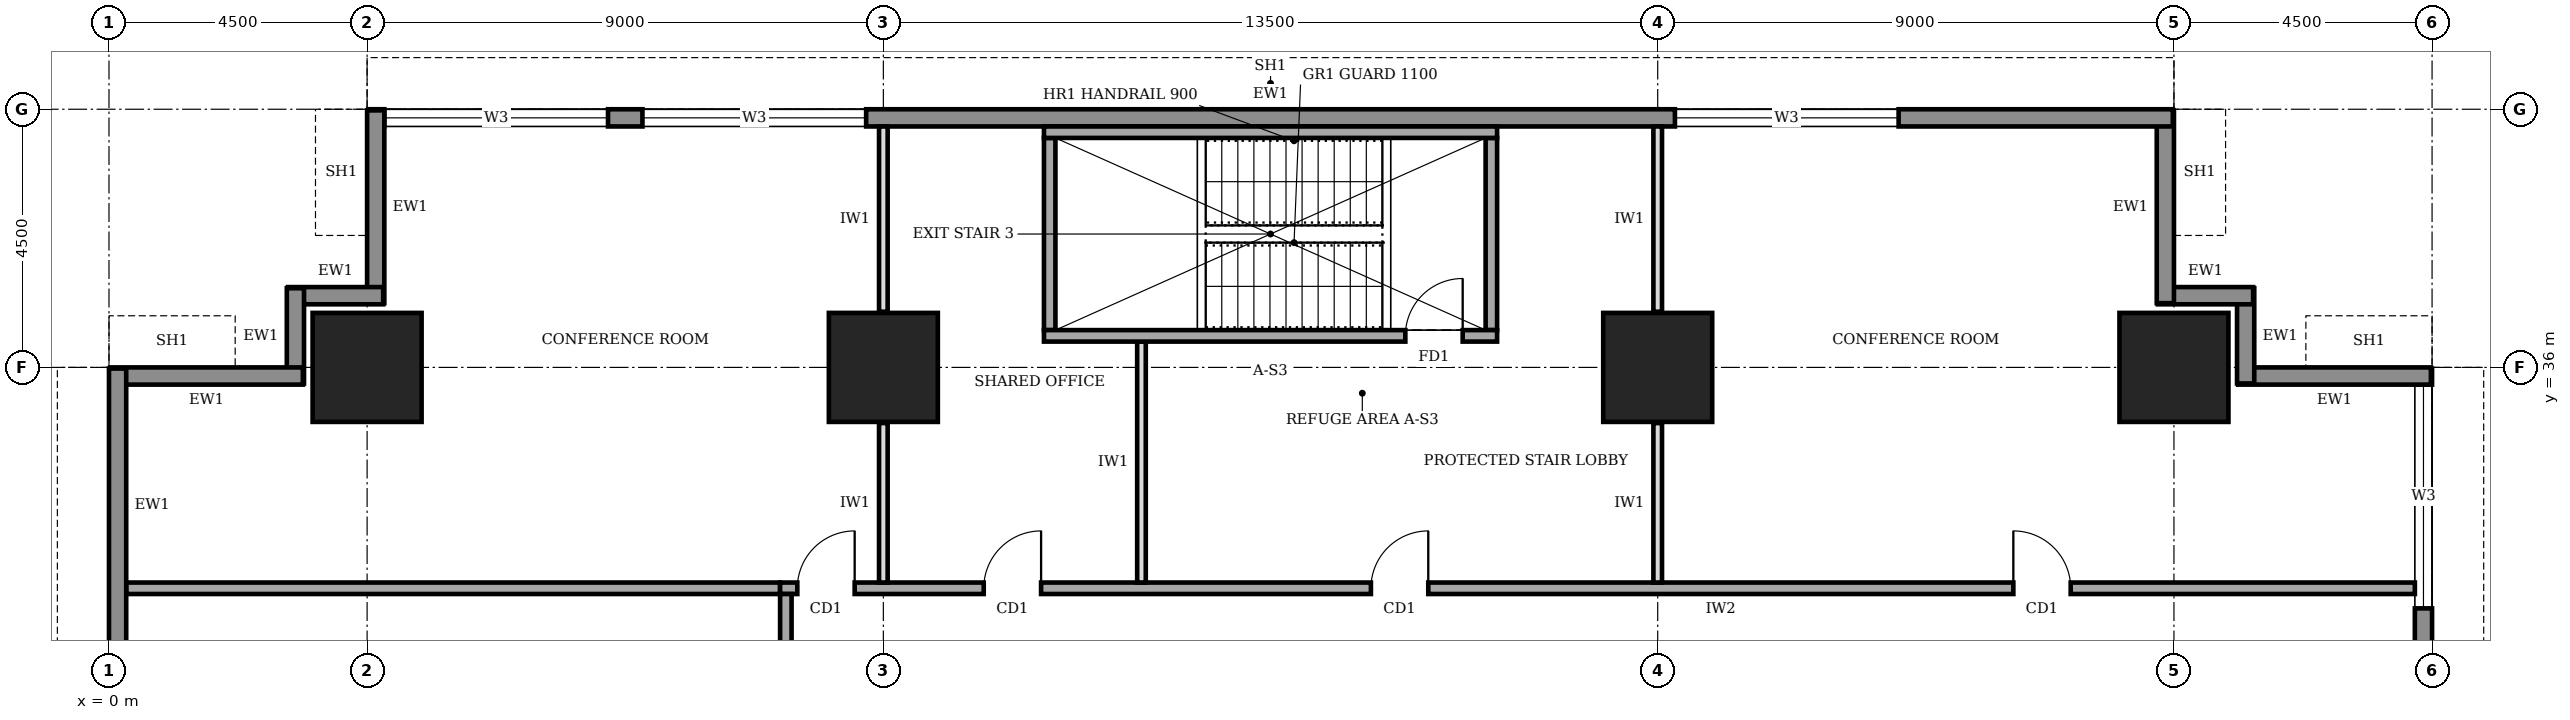
"""IFC4 building model, lengths in metres.
Left out: names, types, materials, properties, quantities, classifications, styles, units other than length and angle.
Written with IfcOpenShell. Run it as: python <this file> out.ifc"""

import sys

from ifc_helpers import new_model, si_unit, direction, frame, frame_2d, origin, origin_2d, place, context, subcontext, project, spatial, rectangle, extrude, element, fill, save


model = new_model("IFC4")
c1 = context("Model", 3, precision=1e-05, world=origin(), true_north=direction((0.0, 1.0)))
c2 = subcontext(c1, "Body", "Model", "MODEL_VIEW")
j1 = project(units=[si_unit("LENGTHUNIT", "METRE"), si_unit("PLANEANGLEUNIT", "RADIAN")], contexts=[c1])
p1 = place(None, origin())
s1 = spatial("IfcSite", under=j1, at=p1, CompositionType="ELEMENT")
p2 = place(p1, origin())
s2 = spatial("IfcBuilding", under=s1, at=p2, CompositionType="ELEMENT")
p3 = place(p2, frame((0.0, 0.0, 101.0)))
s3 = spatial("IfcBuildingStorey", under=s2, at=p3, CompositionType="ELEMENT", Elevation=101.0)
for number, where, z_axis, x_axis in (
    (1, (4.5, 36.0, 0.0), (0.0, 0.0, 1.0), (1.0, 0.0, 0.0)),
    (2, (13.5, 36.0, 0.0), (0.0, 0.0, 1.0), (1.0, 0.0, 0.0)),
    (3, (27.0, 36.0, 0.0), (0.0, 0.0, 1.0), (1.0, 0.0, 0.0)),
    (4, (36.0, 36.0, 0.0), (0.0, 0.0, 1.0), (1.0, 0.0, 0.0)),
):
    element("IfcColumn", number, at=place(p3, frame(where, z_axis=z_axis, x_axis=x_axis)), inside=s3, PredefinedType="COLUMN", context=c2, shape_type="SweptSolid", body=[
        extrude(rectangle(XDim=1.9, YDim=1.9, at=origin_2d()), origin(), (0.0, 0.0, 1.0), 4.0),
    ])
p4 = place(p3, frame((40.48, 35.85, 0.0), z_axis=(0.0, 0.0, 1.0), x_axis=(-1.0, 0.0, 0.0)))
e5 = element("IfcWall", 5, at=p4, inside=s3, PredefinedType="STANDARD", context=c2, shape_type="SweptSolid", body=[
    extrude(rectangle(XDim=3.36, YDim=0.3, at=frame_2d((1.68, 0.0))), origin(), (0.0, 0.0, 1.0), 2.85),
])
for number, where, z_axis, x_axis in (
    (6, (37.25, 35.72, 0.0), (0.0, 0.0, 1.0), (0.0, 1.0, 0.0)),
    (7, (37.38, 37.25, 0.0), (0.0, 0.0, 1.0), (-1.0, 0.0, 0.0)),
):
    element("IfcWall", number, at=place(p3, frame(where, z_axis=z_axis, x_axis=x_axis)), inside=s3, PredefinedType="STANDARD", context=c2, shape_type="SweptSolid", body=[
        extrude(rectangle(XDim=1.66, YDim=0.3, at=frame_2d((0.83, 0.0))), origin(), (0.0, 0.0, 1.0), 3.75),
    ])
p5 = place(p3, frame((35.85, 37.12, 0.0), z_axis=(0.0, 0.0, 1.0), x_axis=(0.0, 1.0, 0.0)))
e8 = element("IfcWall", 8, at=p5, inside=s3, PredefinedType="STANDARD", context=c2, shape_type="SweptSolid", body=[
    extrude(rectangle(XDim=3.36, YDim=0.3, at=frame_2d((1.68, 0.0))), origin(), (0.0, 0.0, 1.0), 2.85),
])
p6 = place(p3, frame((35.98, 40.35, 0.0), z_axis=(0.0, 0.0, 1.0), x_axis=(-1.0, 0.0, 0.0)))
e9 = element("IfcWall", 9, at=p6, inside=s3, PredefinedType="STANDARD", context=c2, shape_type="SweptSolid", body=[
    extrude(rectangle(XDim=31.46, YDim=0.3, at=frame_2d((15.73, 0.0))), origin(), (0.0, 0.0, 1.0), 3.75),
])
p7 = place(p6, frame((27.28, 0.0, 0.95)))
e10 = element("IfcOpeningElement", 10, at=p7, cuts=e9, PredefinedType="OPENING", context=c2, shape_type="SweptSolid", body=[
    extrude(rectangle(XDim=3.9, YDim=1.8, at=frame_2d((1.95, 0.9))), frame((0.0, 0.16, 0.0), z_axis=(0.0, -1.0, 0.0), x_axis=(1.0, 0.0, 0.0)), (0.0, 0.0, 1.0), 0.32),
])
p8 = place(p6, frame((22.78, 0.0, 0.95)))
e11 = element("IfcOpeningElement", 11, at=p8, cuts=e9, PredefinedType="OPENING", context=c2, shape_type="SweptSolid", body=[
    extrude(rectangle(XDim=3.9, YDim=1.8, at=frame_2d((1.95, 0.9))), frame((0.0, 0.16, 0.0), z_axis=(0.0, -1.0, 0.0), x_axis=(1.0, 0.0, 0.0)), (0.0, 0.0, 1.0), 0.32),
])
p9 = place(p6, frame((4.78, 0.0, 0.95)))
e12 = element("IfcOpeningElement", 12, at=p9, cuts=e9, PredefinedType="OPENING", context=c2, shape_type="SweptSolid", body=[
    extrude(rectangle(XDim=3.9, YDim=1.8, at=frame_2d((1.95, 0.9))), frame((0.0, 0.16, 0.0), z_axis=(0.0, -1.0, 0.0), x_axis=(1.0, 0.0, 0.0)), (0.0, 0.0, 1.0), 0.32),
])
p10 = place(p3, frame((4.65, 40.48, 0.0), z_axis=(0.0, 0.0, 1.0), x_axis=(0.0, -1.0, 0.0)))
e13 = element("IfcWall", 13, at=p10, inside=s3, PredefinedType="STANDARD", context=c2, shape_type="SweptSolid", body=[
    extrude(rectangle(XDim=3.36, YDim=0.3, at=frame_2d((1.68, 0.0))), origin(), (0.0, 0.0, 1.0), 2.85),
])
for number, where, z_axis, x_axis in (
    (14, (4.78, 37.25, 0.0), (0.0, 0.0, 1.0), (-1.0, 0.0, 0.0)),
    (15, (3.25, 37.38, 0.0), (0.0, 0.0, 1.0), (0.0, -1.0, 0.0)),
):
    element("IfcWall", number, at=place(p3, frame(where, z_axis=z_axis, x_axis=x_axis)), inside=s3, PredefinedType="STANDARD", context=c2, shape_type="SweptSolid", body=[
        extrude(rectangle(XDim=1.66, YDim=0.3, at=frame_2d((0.83, 0.0))), origin(), (0.0, 0.0, 1.0), 3.75),
    ])
p11 = place(p3, frame((3.38, 35.85, 0.0), z_axis=(0.0, 0.0, 1.0), x_axis=(-1.0, 0.0, 0.0)))
e16 = element("IfcWall", 16, at=p11, inside=s3, PredefinedType="STANDARD", context=c2, shape_type="SweptSolid", body=[
    extrude(rectangle(XDim=3.36, YDim=0.3, at=frame_2d((1.68, 0.0))), origin(), (0.0, 0.0, 1.0), 2.85),
])
p12 = place(p3, frame((0.15, 35.98, 0.0), z_axis=(0.0, 0.0, 1.0), x_axis=(0.0, -1.0, 0.0)))
e17 = element("IfcWall", 17, at=p12, inside=s3, PredefinedType="STANDARD", context=c2, shape_type="SweptSolid", body=[
    extrude(rectangle(XDim=31.46, YDim=0.3, at=frame_2d((15.73, 0.0))), origin(), (0.0, 0.0, 1.0), 3.75),
])
p13 = place(p12, frame((27.28, 0.0, 0.95)))
e18 = element("IfcOpeningElement", 18, at=p13, cuts=e17, PredefinedType="OPENING", context=c2, shape_type="SweptSolid", body=[
    extrude(rectangle(XDim=3.9, YDim=1.8, at=frame_2d((1.95, 0.9))), frame((0.0, 0.16, 0.0), z_axis=(0.0, -1.0, 0.0), x_axis=(1.0, 0.0, 0.0)), (0.0, 0.0, 1.0), 0.32),
])
p14 = place(p12, frame((22.78, 0.0, 0.95)))
e19 = element("IfcOpeningElement", 19, at=p14, cuts=e17, PredefinedType="OPENING", context=c2, shape_type="SweptSolid", body=[
    extrude(rectangle(XDim=3.9, YDim=1.8, at=frame_2d((1.95, 0.9))), frame((0.0, 0.16, 0.0), z_axis=(0.0, -1.0, 0.0), x_axis=(1.0, 0.0, 0.0)), (0.0, 0.0, 1.0), 0.32),
])
p15 = place(p12, frame((18.28, 0.0, 0.95)))
e20 = element("IfcOpeningElement", 20, at=p15, cuts=e17, PredefinedType="OPENING", context=c2, shape_type="SweptSolid", body=[
    extrude(rectangle(XDim=3.9, YDim=1.8, at=frame_2d((1.95, 0.9))), frame((0.0, 0.16, 0.0), z_axis=(0.0, -1.0, 0.0), x_axis=(1.0, 0.0, 0.0)), (0.0, 0.0, 1.0), 0.32),
])
p16 = place(p12, frame((13.78, 0.0, 0.95)))
e21 = element("IfcOpeningElement", 21, at=p16, cuts=e17, PredefinedType="OPENING", context=c2, shape_type="SweptSolid", body=[
    extrude(rectangle(XDim=3.9, YDim=1.8, at=frame_2d((1.95, 0.9))), frame((0.0, 0.16, 0.0), z_axis=(0.0, -1.0, 0.0), x_axis=(1.0, 0.0, 0.0)), (0.0, 0.0, 1.0), 0.32),
])
p17 = place(p12, frame((9.28, 0.0, 0.95)))
e22 = element("IfcOpeningElement", 22, at=p17, cuts=e17, PredefinedType="OPENING", context=c2, shape_type="SweptSolid", body=[
    extrude(rectangle(XDim=3.9, YDim=1.8, at=frame_2d((1.95, 0.9))), frame((0.0, 0.16, 0.0), z_axis=(0.0, -1.0, 0.0), x_axis=(1.0, 0.0, 0.0)), (0.0, 0.0, 1.0), 0.32),
])
p18 = place(p12, frame((4.78, 0.0, 0.95)))
e23 = element("IfcOpeningElement", 23, at=p18, cuts=e17, PredefinedType="OPENING", context=c2, shape_type="SweptSolid", body=[
    extrude(rectangle(XDim=3.9, YDim=1.8, at=frame_2d((1.95, 0.9))), frame((0.0, 0.16, 0.0), z_axis=(0.0, -1.0, 0.0), x_axis=(1.0, 0.0, 0.0)), (0.0, 0.0, 1.0), 0.32),
])
p19 = place(p3, frame((40.2, 32.15, 0.0), z_axis=(0.0, 0.0, 1.0), x_axis=(-1.0, 0.0, 0.0)))
e24 = element("IfcWall", 24, at=p19, inside=s3, PredefinedType="SOLIDWALL", context=c2, shape_type="SweptSolid", body=[
    extrude(rectangle(XDim=28.5, YDim=0.2, at=frame_2d((14.25, 0.0))), origin(), (0.0, 0.0, 1.0), 3.75),
])
p20 = place(p19, frame((27.2, 0.0, 0.0)))
e25 = element("IfcOpeningElement", 25, at=p20, cuts=e24, PredefinedType="OPENING", context=c2, shape_type="SweptSolid", body=[
    extrude(rectangle(XDim=1.0, YDim=2.1, at=frame_2d((0.5, 1.05))), frame((0.0, 0.11, 0.0), z_axis=(0.0, -1.0, 0.0), x_axis=(1.0, 0.0, 0.0)), (0.0, 0.0, 1.0), 0.22),
])
p21 = place(p19, frame((23.95, 0.0, 0.0)))
e26 = element("IfcOpeningElement", 26, at=p21, cuts=e24, PredefinedType="OPENING", context=c2, shape_type="SweptSolid", body=[
    extrude(rectangle(XDim=1.0, YDim=2.1, at=frame_2d((0.5, 1.05))), frame((0.0, 0.11, 0.0), z_axis=(0.0, -1.0, 0.0), x_axis=(1.0, 0.0, 0.0)), (0.0, 0.0, 1.0), 0.22),
])
p22 = place(p19, frame((17.2, 0.0, 0.0)))
e27 = element("IfcOpeningElement", 27, at=p22, cuts=e24, PredefinedType="OPENING", context=c2, shape_type="SweptSolid", body=[
    extrude(rectangle(XDim=1.0, YDim=2.1, at=frame_2d((0.5, 1.05))), frame((0.0, 0.11, 0.0), z_axis=(0.0, -1.0, 0.0), x_axis=(1.0, 0.0, 0.0)), (0.0, 0.0, 1.0), 0.22),
])
p23 = place(p19, frame((6.0, 0.0, 0.0)))
e28 = element("IfcOpeningElement", 28, at=p23, cuts=e24, PredefinedType="OPENING", context=c2, shape_type="SweptSolid", body=[
    extrude(rectangle(XDim=1.0, YDim=2.1, at=frame_2d((0.5, 1.05))), frame((0.0, 0.11, 0.0), z_axis=(0.0, -1.0, 0.0), x_axis=(1.0, 0.0, 0.0)), (0.0, 0.0, 1.0), 0.22),
])
p24 = place(p3, frame((11.8, 32.05, 0.0), z_axis=(0.0, 0.0, 1.0), x_axis=(0.0, -1.0, 0.0)))
e29 = element("IfcWall", 29, at=p24, inside=s3, PredefinedType="SOLIDWALL", context=c2, shape_type="SweptSolid", body=[
    extrude(rectangle(XDim=23.8, YDim=0.2, at=frame_2d((11.9, 0.0))), origin(), (0.0, 0.0, 1.0), 3.75),
])
p25 = place(p24, frame((20.675, 0.0, 0.0)))
e30 = element("IfcOpeningElement", 30, at=p25, cuts=e29, PredefinedType="OPENING", context=c2, shape_type="SweptSolid", body=[
    extrude(rectangle(XDim=1.0, YDim=2.1, at=frame_2d((0.5, 1.05))), frame((0.0, 0.11, 0.0), z_axis=(0.0, -1.0, 0.0), x_axis=(1.0, 0.0, 0.0)), (0.0, 0.0, 1.0), 0.22),
])
p26 = place(p24, frame((16.2, 0.0, 0.0)))
e31 = element("IfcOpeningElement", 31, at=p26, cuts=e29, PredefinedType="OPENING", context=c2, shape_type="SweptSolid", body=[
    extrude(rectangle(XDim=0.9, YDim=2.1, at=frame_2d((0.45, 1.05))), frame((0.0, 0.11, 0.0), z_axis=(0.0, -1.0, 0.0), x_axis=(1.0, 0.0, 0.0)), (0.0, 0.0, 1.0), 0.22),
])
p27 = place(p24, frame((13.2, 0.0, 0.0)))
e32 = element("IfcOpeningElement", 32, at=p27, cuts=e29, PredefinedType="OPENING", context=c2, shape_type="SweptSolid", body=[
    extrude(rectangle(XDim=0.9, YDim=2.1, at=frame_2d((0.45, 1.05))), frame((0.0, 0.11, 0.0), z_axis=(0.0, -1.0, 0.0), x_axis=(1.0, 0.0, 0.0)), (0.0, 0.0, 1.0), 0.22),
])
p28 = place(p24, frame((8.35, 0.0, 0.0)))
e33 = element("IfcOpeningElement", 33, at=p28, cuts=e29, PredefinedType="OPENING", context=c2, shape_type="SweptSolid", body=[
    extrude(rectangle(XDim=0.9, YDim=2.1, at=frame_2d((0.45, 1.05))), frame((0.0, 0.11, 0.0), z_axis=(0.0, -1.0, 0.0), x_axis=(1.0, 0.0, 0.0)), (0.0, 0.0, 1.0), 0.22),
])
p29 = place(p24, frame((5.55, 0.0, 0.0)))
e34 = element("IfcOpeningElement", 34, at=p29, cuts=e29, PredefinedType="OPENING", context=c2, shape_type="SweptSolid", body=[
    extrude(rectangle(XDim=1.0, YDim=2.1, at=frame_2d((0.5, 1.05))), frame((0.0, 0.11, 0.0), z_axis=(0.0, -1.0, 0.0), x_axis=(1.0, 0.0, 0.0)), (0.0, 0.0, 1.0), 0.22),
])
p30 = place(p24, frame((11.05, 0.0, 0.0)))
e35 = element("IfcOpeningElement", 35, at=p30, cuts=e29, PredefinedType="OPENING", context=c2, shape_type="SweptSolid", body=[
    extrude(rectangle(XDim=1.0, YDim=2.1, at=frame_2d((0.5, 1.05))), frame((0.0, 0.11, 0.0), z_axis=(0.0, -1.0, 0.0), x_axis=(1.0, 0.0, 0.0)), (0.0, 0.0, 1.0), 0.22),
])
p31 = place(p24, frame((1.925, 0.0, 0.0)))
e36 = element("IfcOpeningElement", 36, at=p31, cuts=e29, PredefinedType="OPENING", context=c2, shape_type="SweptSolid", body=[
    extrude(rectangle(XDim=1.0, YDim=2.1, at=frame_2d((0.5, 1.05))), frame((0.0, 0.11, 0.0), z_axis=(0.0, -1.0, 0.0), x_axis=(1.0, 0.0, 0.0)), (0.0, 0.0, 1.0), 0.22),
])
p32 = place(p3, frame((0.3, 32.15, 0.0), z_axis=(0.0, 0.0, 1.0), x_axis=(1.0, 0.0, 0.0)))
e37 = element("IfcWall", 37, at=p32, inside=s3, PredefinedType="SOLIDWALL", context=c2, shape_type="SweptSolid", body=[
    extrude(rectangle(XDim=11.4, YDim=0.2, at=frame_2d((5.7, 0.0))), origin(), (0.0, 0.0, 1.0), 3.75),
])
p33 = place(p3, frame((13.5, 32.25, 0.0), z_axis=(0.0, 0.0, 1.0), x_axis=(0.0, 1.0, 0.0)))
e38 = element("IfcWall", 38, at=p33, inside=s3, PredefinedType="PARTITIONING", context=c2, shape_type="SweptSolid", body=[
    extrude(rectangle(XDim=2.78, YDim=0.15, at=frame_2d((1.39, 0.0))), origin(), (0.0, 0.0, 1.0), 2.85),
])
p34 = place(p3, frame((13.5, 36.97, 0.0), z_axis=(0.0, 0.0, 1.0), x_axis=(0.0, 1.0, 0.0)))
e39 = element("IfcWall", 39, at=p34, inside=s3, PredefinedType="PARTITIONING", context=c2, shape_type="SweptSolid", body=[
    extrude(rectangle(XDim=3.23, YDim=0.15, at=frame_2d((1.615, 0.0))), origin(), (0.0, 0.0, 1.0), 2.85),
])
p35 = place(p3, frame((18.0, 32.25, 0.0), z_axis=(0.0, 0.0, 1.0), x_axis=(0.0, 1.0, 0.0)))
e40 = element("IfcWall", 40, at=p35, inside=s3, PredefinedType="PARTITIONING", context=c2, shape_type="SweptSolid", body=[
    extrude(rectangle(XDim=4.2, YDim=0.15, at=frame_2d((2.1, 0.0))), origin(), (0.0, 0.0, 1.0), 3.75),
])
p36 = place(p3, frame((27.0, 32.25, 0.0), z_axis=(0.0, 0.0, 1.0), x_axis=(0.0, 1.0, 0.0)))
e41 = element("IfcWall", 41, at=p36, inside=s3, PredefinedType="PARTITIONING", context=c2, shape_type="SweptSolid", body=[
    extrude(rectangle(XDim=2.78, YDim=0.15, at=frame_2d((1.39, 0.0))), origin(), (0.0, 0.0, 1.0), 2.85),
])
p37 = place(p3, frame((27.0, 36.97, 0.0), z_axis=(0.0, 0.0, 1.0), x_axis=(0.0, 1.0, 0.0)))
e42 = element("IfcWall", 42, at=p37, inside=s3, PredefinedType="PARTITIONING", context=c2, shape_type="SweptSolid", body=[
    extrude(rectangle(XDim=3.23, YDim=0.15, at=frame_2d((1.615, 0.0))), origin(), (0.0, 0.0, 1.0), 2.85),
])
p38 = place(p3, frame((16.3, 36.55, 0.0), z_axis=(0.0, 0.0, 1.0), x_axis=(1.0, 0.0, 0.0)))
e43 = element("IfcWall", 43, at=p38, inside=s3, PredefinedType="SOLIDWALL", context=c2, shape_type="SweptSolid", body=[
    extrude(rectangle(XDim=7.9, YDim=0.2, at=frame_2d((3.95, 0.0))), origin(), (0.0, 0.0, 1.0), 3.75),
])
p39 = place(p38, frame((6.3, 0.0, 0.0)))
e44 = element("IfcOpeningElement", 44, at=p39, cuts=e43, PredefinedType="OPENING", context=c2, shape_type="SweptSolid", body=[
    extrude(rectangle(XDim=1.0, YDim=2.1, at=frame_2d((0.5, 1.05))), frame((0.0, 0.11, 0.0), z_axis=(0.0, -1.0, 0.0), x_axis=(1.0, 0.0, 0.0)), (0.0, 0.0, 1.0), 0.22),
])
p40 = place(p3, frame((16.3, 40.1, 0.0), z_axis=(0.0, 0.0, 1.0), x_axis=(1.0, 0.0, 0.0)))
e45 = element("IfcWall", 45, at=p40, inside=s3, PredefinedType="SOLIDWALL", context=c2, shape_type="SweptSolid", body=[
    extrude(rectangle(XDim=7.9, YDim=0.2, at=frame_2d((3.95, 0.0))), origin(), (0.0, 0.0, 1.0), 3.75),
])
for number, where, z_axis, x_axis in (
    (46, (16.4, 36.65, 0.0), (0.0, 0.0, 1.0), (0.0, 1.0, 0.0)),
    (47, (24.1, 36.65, 0.0), (0.0, 0.0, 1.0), (0.0, 1.0, 0.0)),
):
    element("IfcWall", number, at=place(p3, frame(where, z_axis=z_axis, x_axis=x_axis)), inside=s3, PredefinedType="SOLIDWALL", context=c2, shape_type="SweptSolid", body=[
        extrude(rectangle(XDim=3.35, YDim=0.2, at=frame_2d((1.675, 0.0))), origin(), (0.0, 0.0, 1.0), 3.75),
    ])
p41 = place(p3, frame((40.35, 29.25, 0.0), z_axis=(0.0, 0.0, 1.0), x_axis=(0.0, 1.0, 0.0)))
e48 = element("IfcWall", 48, at=p41, inside=s3, PredefinedType="STANDARD", context=c2, shape_type="SweptSolid", body=[
    extrude(rectangle(XDim=6.73, YDim=0.3, at=frame_2d((3.365, 0.0))), origin(), (0.0, 0.0, 1.0), 3.75),
])
p42 = place(p41, frame((2.55, 0.0, 0.95)))
e49 = element("IfcOpeningElement", 49, at=p42, cuts=e48, PredefinedType="OPENING", context=c2, shape_type="SweptSolid", body=[
    extrude(rectangle(XDim=3.9, YDim=1.8, at=frame_2d((1.95, 0.9))), frame((0.0, 0.16, 0.0), z_axis=(0.0, -1.0, 0.0), x_axis=(1.0, 0.0, 0.0)), (0.0, 0.0, 1.0), 0.32),
])
p43 = place(p42, origin())
e50 = element("IfcWindow", 50, at=p43, inside=s3, PartitioningType="SINGLE_PANEL", PredefinedType="WINDOW", context=c2, shape_type="SweptSolid", body=[
    extrude(rectangle(XDim=3.9, YDim=1.8, at=frame_2d((1.95, 0.9))), frame((0.0, 0.03, 0.0), z_axis=(0.0, -1.0, 0.0), x_axis=(1.0, 0.0, 0.0)), (0.0, 0.0, 1.0), 0.06),
])
fill(e49, e50)
p44 = place(p7, origin())
e51 = element("IfcWindow", 51, at=p44, inside=s3, PartitioningType="SINGLE_PANEL", PredefinedType="WINDOW", context=c2, shape_type="SweptSolid", body=[
    extrude(rectangle(XDim=3.9, YDim=1.8, at=frame_2d((1.95, 0.9))), frame((0.0, 0.03, 0.0), z_axis=(0.0, -1.0, 0.0), x_axis=(1.0, 0.0, 0.0)), (0.0, 0.0, 1.0), 0.06),
])
fill(e10, e51)
p45 = place(p8, origin())
e52 = element("IfcWindow", 52, at=p45, inside=s3, PartitioningType="SINGLE_PANEL", PredefinedType="WINDOW", context=c2, shape_type="SweptSolid", body=[
    extrude(rectangle(XDim=3.9, YDim=1.8, at=frame_2d((1.95, 0.9))), frame((0.0, 0.03, 0.0), z_axis=(0.0, -1.0, 0.0), x_axis=(1.0, 0.0, 0.0)), (0.0, 0.0, 1.0), 0.06),
])
fill(e11, e52)
p46 = place(p9, origin())
e53 = element("IfcWindow", 53, at=p46, inside=s3, PartitioningType="SINGLE_PANEL", PredefinedType="WINDOW", context=c2, shape_type="SweptSolid", body=[
    extrude(rectangle(XDim=3.9, YDim=1.8, at=frame_2d((1.95, 0.9))), frame((0.0, 0.03, 0.0), z_axis=(0.0, -1.0, 0.0), x_axis=(1.0, 0.0, 0.0)), (0.0, 0.0, 1.0), 0.06),
])
fill(e12, e53)
p47 = place(p20, frame((1.0, 0.0, 0.0), z_axis=(0.0, 0.0, 1.0), x_axis=(-1.0, 0.0, 0.0)))
e54 = element("IfcDoor", 54, at=p47, inside=s3, OperationType="SINGLE_SWING_RIGHT", PredefinedType="DOOR", context=c2, shape_type="SweptSolid", body=[
    extrude(rectangle(XDim=1.0, YDim=2.1, at=frame_2d((0.5, 1.05))), frame((0.0, 0.025, 0.0), z_axis=(0.0, -1.0, 0.0), x_axis=(1.0, 0.0, 0.0)), (0.0, 0.0, 1.0), 0.05),
])
fill(e25, e54)
p48 = place(p21, frame((1.0, 0.0, 0.0), z_axis=(0.0, 0.0, 1.0), x_axis=(-1.0, 0.0, 0.0)))
e55 = element("IfcDoor", 55, at=p48, inside=s3, OperationType="SINGLE_SWING_RIGHT", PredefinedType="DOOR", context=c2, shape_type="SweptSolid", body=[
    extrude(rectangle(XDim=1.0, YDim=2.1, at=frame_2d((0.5, 1.05))), frame((0.0, 0.025, 0.0), z_axis=(0.0, -1.0, 0.0), x_axis=(1.0, 0.0, 0.0)), (0.0, 0.0, 1.0), 0.05),
])
fill(e26, e55)
p49 = place(p22, frame((1.0, 0.0, 0.0), z_axis=(0.0, 0.0, 1.0), x_axis=(-1.0, 0.0, 0.0)))
e56 = element("IfcDoor", 56, at=p49, inside=s3, OperationType="SINGLE_SWING_RIGHT", PredefinedType="DOOR", context=c2, shape_type="SweptSolid", body=[
    extrude(rectangle(XDim=1.0, YDim=2.1, at=frame_2d((0.5, 1.05))), frame((0.0, 0.025, 0.0), z_axis=(0.0, -1.0, 0.0), x_axis=(1.0, 0.0, 0.0)), (0.0, 0.0, 1.0), 0.05),
])
fill(e27, e56)
p50 = place(p23, frame((1.0, 0.0, 0.0), z_axis=(0.0, 0.0, 1.0), x_axis=(-1.0, 0.0, 0.0)))
e57 = element("IfcDoor", 57, at=p50, inside=s3, OperationType="SINGLE_SWING_LEFT", PredefinedType="DOOR", context=c2, shape_type="SweptSolid", body=[
    extrude(rectangle(XDim=1.0, YDim=2.1, at=frame_2d((0.5, 1.05))), frame((0.0, 0.025, 0.0), z_axis=(0.0, -1.0, 0.0), x_axis=(1.0, 0.0, 0.0)), (0.0, 0.0, 1.0), 0.05),
])
fill(e28, e57)
p51 = place(p39, origin())
e58 = element("IfcDoor", 58, at=p51, inside=s3, OperationType="SINGLE_SWING_RIGHT", PredefinedType="DOOR", context=c2, shape_type="SweptSolid", body=[
    extrude(rectangle(XDim=1.0, YDim=2.1, at=frame_2d((0.5, 1.05))), frame((0.0, 0.025, 0.0), z_axis=(0.0, -1.0, 0.0), x_axis=(1.0, 0.0, 0.0)), (0.0, 0.0, 1.0), 0.05),
])
fill(e44, e58)
save(model, sys.argv[1])
